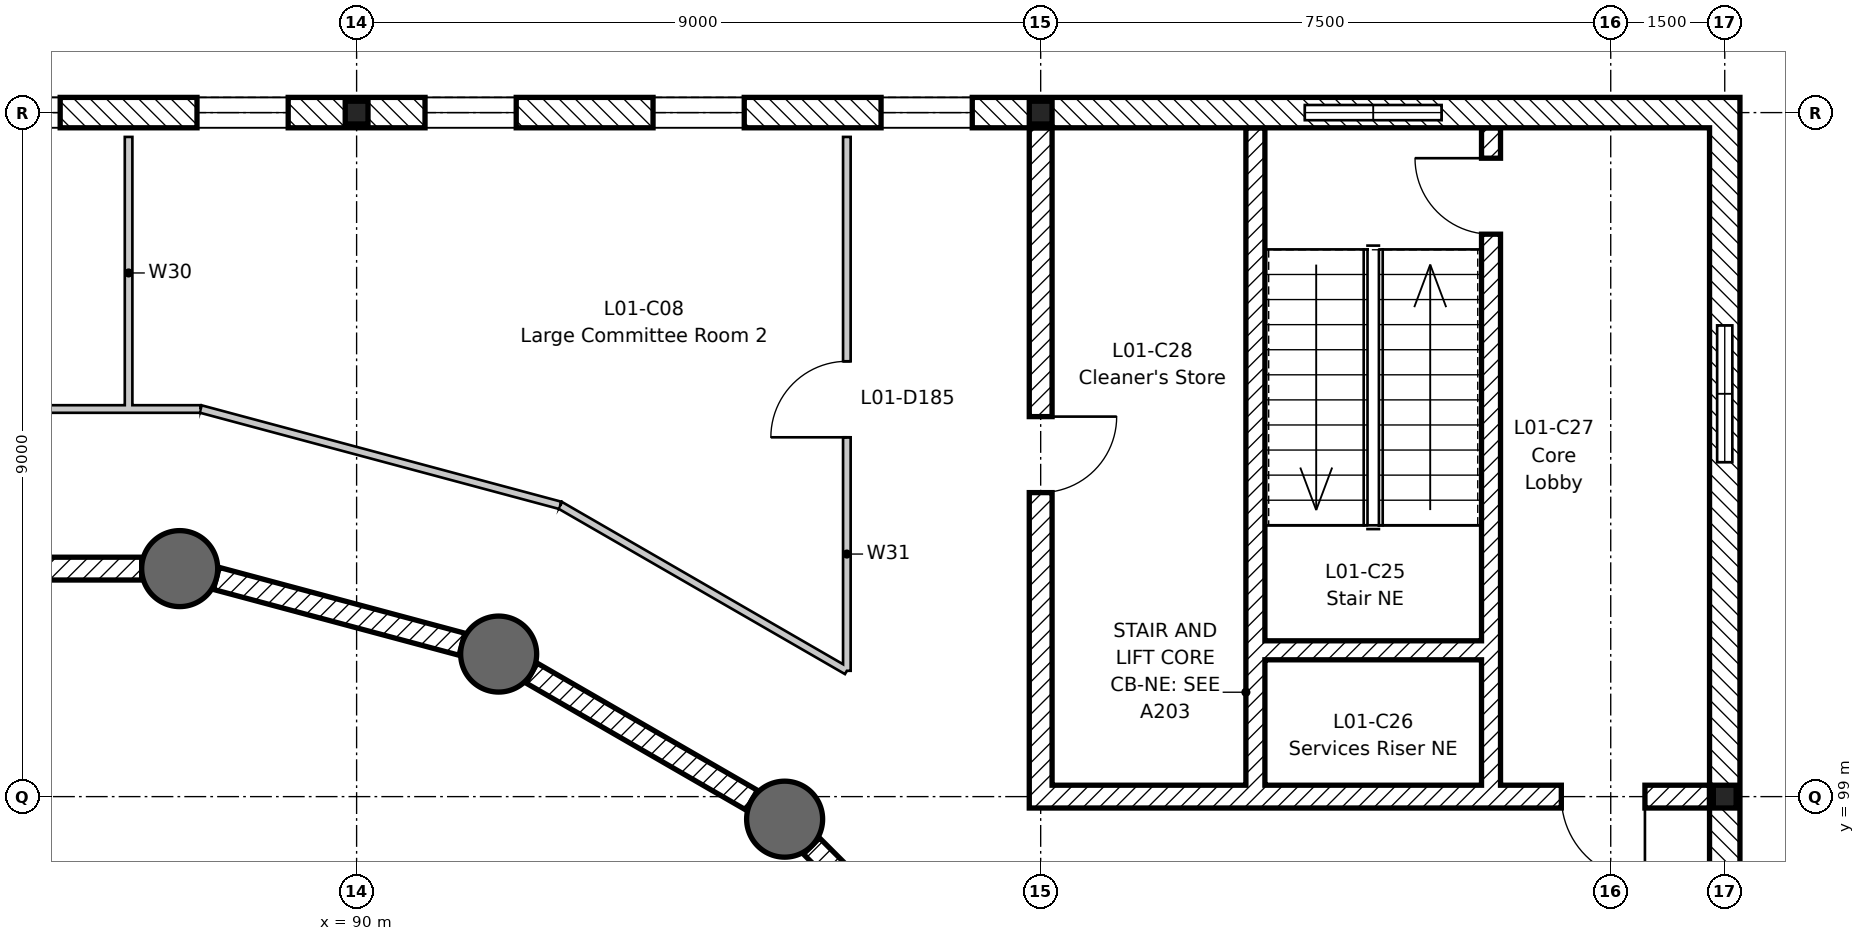
"""IFC4 building model, lengths in metres.
Left out: names, types, materials, properties, quantities, classifications, styles, units other than length and angle.
Written with IfcOpenShell. Run it as: python <this file> out.ifc"""

import sys

from ifc_helpers import new_model, si_unit, direction, frame, frame_2d, origin, origin_2d, place, context, subcontext, project, spatial, rectangle, circle, i_section, extrude, element, fill, save


model = new_model("IFC4")
c1 = context("Model", 3, precision=1e-05, world=origin(), true_north=direction((0.0, 1.0)))
c2 = subcontext(c1, "Body", "Model", "MODEL_VIEW")
j1 = project(units=[si_unit("LENGTHUNIT", "METRE"), si_unit("PLANEANGLEUNIT", "RADIAN")], contexts=[c1])
p1 = place(None, origin())
s1 = spatial("IfcSite", under=j1, at=p1, CompositionType="ELEMENT")
p2 = place(p1, origin())
s2 = spatial("IfcBuilding", under=s1, at=p2, CompositionType="ELEMENT")
p3 = place(p2, frame((0.0, 0.0, 5.4)))
s3 = spatial("IfcBuildingStorey", under=s2, at=p3, CompositionType="ELEMENT", Elevation=5.4)
for number, where, z_axis, x_axis in (
    (1, (95.631, 98.703, -0.2), (0.0, 0.0, 1.0), (1.0, 0.0, 0.0)),
    (2, (91.869, 100.875, -0.2), (0.0, 0.0, 1.0), (1.0, 0.0, 0.0)),
    (3, (87.672, 102.0, -0.2), (0.0, 0.0, 1.0), (1.0, 0.0, 0.0)),
):
    element("IfcColumn", number, at=place(p3, frame(where, z_axis=z_axis, x_axis=x_axis)), inside=s3, PredefinedType="COLUMN", context=c2, shape_type="SweptSolid", body=[
        extrude(circle(Radius=0.5, at=origin_2d()), origin(), (0.0, 0.0, 1.0), 2.7),
    ])
for number, where, z_axis, x_axis in (
    (4, (90.0, 108.0, -0.2), (0.0, 0.0, 1.0), (1.0, 0.0, 0.0)),
    (5, (99.0, 108.0, -0.2), (0.0, 0.0, 1.0), (1.0, 0.0, 0.0)),
    (6, (108.0, 99.0, -0.2), (0.0, 0.0, 1.0), (1.0, 0.0, 0.0)),
):
    element("IfcColumn", number, at=place(p3, frame(where, z_axis=z_axis, x_axis=x_axis)), inside=s3, PredefinedType="COLUMN", context=c2, shape_type="SweptSolid", body=[
        extrude(i_section(OverallWidth=0.3, OverallDepth=0.3, WebThickness=0.011, FlangeThickness=0.019, FilletRadius=0.027, at=origin_2d()), origin(), (0.0, 0.0, 1.0), 4.5),
    ])
p4 = place(p3, frame((98.35, 95.985, 0.0), z_axis=(0.0, 0.0, 1.0), x_axis=(-0.707106781187, 0.707106781187, 0.0)))
e7 = element("IfcWall", 7, at=p4, inside=s3, PredefinedType="PARTITIONING", context=c2, shape_type="SweptSolid", body=[
    extrude(rectangle(XDim=3.344, YDim=0.3, at=frame_2d((1.672, 0.0))), origin(), (0.0, 0.0, 1.0), 2.5),
])
for number, where, z_axis, x_axis in (
    (8, (95.198, 98.953, 0.0), (0.0, 0.0, 1.0), (-0.866, 0.5, 0.0)),
    (9, (91.386, 101.005, 0.0), (0.0, 0.0, 1.0), (-0.966, 0.259, 0.0)),
):
    element("IfcWall", number, at=place(p3, frame(where, z_axis=z_axis, x_axis=x_axis)), inside=s3, PredefinedType="PARTITIONING", context=c2, shape_type="SweptSolid", body=[
        extrude(rectangle(XDim=3.344, YDim=0.3, at=frame_2d((1.672, 0.0))), origin(), (0.0, 0.0, 1.0), 2.5),
    ])
p5 = place(p3, frame((87.172, 102.0, 0.0), z_axis=(0.0, 0.0, 1.0), x_axis=(-1.0, 0.0, 0.0)))
e10 = element("IfcWall", 10, at=p5, inside=s3, PredefinedType="PARTITIONING", context=c2, shape_type="SweptSolid", body=[
    extrude(rectangle(XDim=3.345, YDim=0.3, at=frame_2d((1.672, 0.0))), origin(), (0.0, 0.0, 1.0), 2.5),
])
p6 = place(p3, frame((107.8, 99.0, 0.0), z_axis=(0.0, 0.0, 1.0), x_axis=(-1.0, 0.0, 0.0)))
e11 = element("IfcWall", 11, at=p6, inside=s3, PredefinedType="SHEAR", context=c2, shape_type="SweptSolid", body=[
    extrude(rectangle(XDim=8.95, YDim=0.3, at=frame_2d((4.475, 0.0))), origin(), (0.0, 0.0, 1.0), 4.3),
])
p7 = place(p6, frame((0.85, 0.0, 0.0)))
e12 = element("IfcOpeningElement", 12, at=p7, cuts=e11, PredefinedType="OPENING", context=c2, shape_type="SweptSolid", body=[
    extrude(rectangle(XDim=1.1, YDim=2.1, at=frame_2d((0.55, 1.05))), frame((0.0, 0.16, 0.0), z_axis=(0.0, -1.0, 0.0), x_axis=(1.0, 0.0, 0.0)), (0.0, 0.0, 1.0), 0.32),
])
p8 = place(p3, frame((99.0, 107.8, 0.0), z_axis=(0.0, 0.0, 1.0), x_axis=(0.0, -1.0, 0.0)))
e13 = element("IfcWall", 13, at=p8, inside=s3, PredefinedType="SHEAR", context=c2, shape_type="SweptSolid", body=[
    extrude(rectangle(XDim=8.65, YDim=0.3, at=frame_2d((4.325, 0.0))), origin(), (0.0, 0.0, 1.0), 4.3),
])
p9 = place(p8, frame((3.8, 0.0, 0.0)))
e14 = element("IfcOpeningElement", 14, at=p9, cuts=e13, PredefinedType="OPENING", context=c2, shape_type="SweptSolid", body=[
    extrude(rectangle(XDim=1.0, YDim=2.1, at=frame_2d((0.5, 1.05))), frame((0.0, 0.16, 0.0), z_axis=(0.0, -1.0, 0.0), x_axis=(1.0, 0.0, 0.0)), (0.0, 0.0, 1.0), 0.32),
])
p10 = place(p3, frame((104.925, 107.8, 0.0), z_axis=(0.0, 0.0, 1.0), x_axis=(0.0, -1.0, 0.0)))
e15 = element("IfcWall", 15, at=p10, inside=s3, PredefinedType="SHEAR", context=c2, shape_type="SweptSolid", body=[
    extrude(rectangle(XDim=8.65, YDim=0.25, at=frame_2d((4.325, 0.0))), origin(), (0.0, 0.0, 1.0), 4.3),
])
p11 = place(p10, frame((0.4, 0.0, 0.0)))
e16 = element("IfcOpeningElement", 16, at=p11, cuts=e15, PredefinedType="OPENING", context=c2, shape_type="SweptSolid", body=[
    extrude(rectangle(XDim=1.0, YDim=2.1, at=frame_2d((0.5, 1.05))), frame((0.0, 0.135, 0.0), z_axis=(0.0, -1.0, 0.0), x_axis=(1.0, 0.0, 0.0)), (0.0, 0.0, 1.0), 0.27),
])
p12 = place(p3, frame((101.825, 107.8, 0.0), z_axis=(0.0, 0.0, 1.0), x_axis=(0.0, -1.0, 0.0)))
e17 = element("IfcWall", 17, at=p12, inside=s3, PredefinedType="SHEAR", context=c2, shape_type="SweptSolid", body=[
    extrude(rectangle(XDim=8.65, YDim=0.25, at=frame_2d((4.325, 0.0))), origin(), (0.0, 0.0, 1.0), 4.3),
])
p13 = place(p3, frame((104.8, 100.925, 0.0), z_axis=(0.0, 0.0, 1.0), x_axis=(-1.0, 0.0, 0.0)))
e18 = element("IfcWall", 18, at=p13, inside=s3, PredefinedType="SHEAR", context=c2, shape_type="SweptSolid", body=[
    extrude(rectangle(XDim=2.85, YDim=0.25, at=frame_2d((1.425, 0.0))), origin(), (0.0, 0.0, 1.0), 4.3),
])
p14 = place(p3, frame((72.0, 108.0, 0.0), z_axis=(0.0, 0.0, 1.0), x_axis=(1.0, 0.0, 0.0)))
e19 = element("IfcWall", 19, at=p14, inside=s3, PredefinedType="STANDARD", context=c2, shape_type="SweptSolid", body=[
    extrude(rectangle(XDim=27.0, YDim=0.4, at=frame_2d((13.5, 0.0))), origin(), (0.0, 0.0, 1.0), 3.81),
])
p15 = place(p14, frame((0.9, 0.0, 0.9)))
e20 = element("IfcOpeningElement", 20, at=p15, cuts=e19, PredefinedType="OPENING", context=c2, shape_type="SweptSolid", body=[
    extrude(rectangle(XDim=1.2, YDim=2.4, at=frame_2d((0.6, 1.2))), frame((0.0, 0.21, 0.0), z_axis=(0.0, -1.0, 0.0), x_axis=(1.0, 0.0, 0.0)), (0.0, 0.0, 1.0), 0.42),
])
p16 = place(p14, frame((3.9, 0.0, 0.9)))
e21 = element("IfcOpeningElement", 21, at=p16, cuts=e19, PredefinedType="OPENING", context=c2, shape_type="SweptSolid", body=[
    extrude(rectangle(XDim=1.2, YDim=2.4, at=frame_2d((0.6, 1.2))), frame((0.0, 0.21, 0.0), z_axis=(0.0, -1.0, 0.0), x_axis=(1.0, 0.0, 0.0)), (0.0, 0.0, 1.0), 0.42),
])
p17 = place(p14, frame((6.9, 0.0, 0.9)))
e22 = element("IfcOpeningElement", 22, at=p17, cuts=e19, PredefinedType="OPENING", context=c2, shape_type="SweptSolid", body=[
    extrude(rectangle(XDim=1.2, YDim=2.4, at=frame_2d((0.6, 1.2))), frame((0.0, 0.21, 0.0), z_axis=(0.0, -1.0, 0.0), x_axis=(1.0, 0.0, 0.0)), (0.0, 0.0, 1.0), 0.42),
])
p18 = place(p14, frame((9.9, 0.0, 0.9)))
e23 = element("IfcOpeningElement", 23, at=p18, cuts=e19, PredefinedType="OPENING", context=c2, shape_type="SweptSolid", body=[
    extrude(rectangle(XDim=1.2, YDim=2.4, at=frame_2d((0.6, 1.2))), frame((0.0, 0.21, 0.0), z_axis=(0.0, -1.0, 0.0), x_axis=(1.0, 0.0, 0.0)), (0.0, 0.0, 1.0), 0.42),
])
p19 = place(p14, frame((12.9, 0.0, 0.9)))
e24 = element("IfcOpeningElement", 24, at=p19, cuts=e19, PredefinedType="OPENING", context=c2, shape_type="SweptSolid", body=[
    extrude(rectangle(XDim=1.2, YDim=2.4, at=frame_2d((0.6, 1.2))), frame((0.0, 0.21, 0.0), z_axis=(0.0, -1.0, 0.0), x_axis=(1.0, 0.0, 0.0)), (0.0, 0.0, 1.0), 0.42),
])
p20 = place(p14, frame((15.9, 0.0, 0.9)))
e25 = element("IfcOpeningElement", 25, at=p20, cuts=e19, PredefinedType="OPENING", context=c2, shape_type="SweptSolid", body=[
    extrude(rectangle(XDim=1.2, YDim=2.4, at=frame_2d((0.6, 1.2))), frame((0.0, 0.21, 0.0), z_axis=(0.0, -1.0, 0.0), x_axis=(1.0, 0.0, 0.0)), (0.0, 0.0, 1.0), 0.42),
])
p21 = place(p14, frame((18.9, 0.0, 0.9)))
e26 = element("IfcOpeningElement", 26, at=p21, cuts=e19, PredefinedType="OPENING", context=c2, shape_type="SweptSolid", body=[
    extrude(rectangle(XDim=1.2, YDim=2.4, at=frame_2d((0.6, 1.2))), frame((0.0, 0.21, 0.0), z_axis=(0.0, -1.0, 0.0), x_axis=(1.0, 0.0, 0.0)), (0.0, 0.0, 1.0), 0.42),
])
p22 = place(p14, frame((21.9, 0.0, 0.9)))
e27 = element("IfcOpeningElement", 27, at=p22, cuts=e19, PredefinedType="OPENING", context=c2, shape_type="SweptSolid", body=[
    extrude(rectangle(XDim=1.2, YDim=2.4, at=frame_2d((0.6, 1.2))), frame((0.0, 0.21, 0.0), z_axis=(0.0, -1.0, 0.0), x_axis=(1.0, 0.0, 0.0)), (0.0, 0.0, 1.0), 0.42),
])
p23 = place(p14, frame((24.9, 0.0, 0.9)))
e28 = element("IfcOpeningElement", 28, at=p23, cuts=e19, PredefinedType="OPENING", context=c2, shape_type="SweptSolid", body=[
    extrude(rectangle(XDim=1.2, YDim=2.4, at=frame_2d((0.6, 1.2))), frame((0.0, 0.21, 0.0), z_axis=(0.0, -1.0, 0.0), x_axis=(1.0, 0.0, 0.0)), (0.0, 0.0, 1.0), 0.42),
])
p24 = place(p3, frame((99.0, 108.0, 0.0), z_axis=(0.0, 0.0, 1.0), x_axis=(1.0, 0.0, 0.0)))
e29 = element("IfcWall", 29, at=p24, inside=s3, PredefinedType="STANDARD", context=c2, shape_type="SweptSolid", body=[
    extrude(rectangle(XDim=3.475, YDim=0.4, at=frame_2d((1.738, 0.0))), origin(), (0.0, 0.0, 1.0), 4.3),
])
p25 = place(p3, frame((104.275, 108.0, 0.0), z_axis=(0.0, 0.0, 1.0), x_axis=(1.0, 0.0, 0.0)))
e30 = element("IfcWall", 30, at=p25, inside=s3, PredefinedType="STANDARD", context=c2, shape_type="SweptSolid", body=[
    extrude(rectangle(XDim=3.925, YDim=0.4, at=frame_2d((1.962, 0.0))), origin(), (0.0, 0.0, 1.0), 4.3),
])
p26 = place(p3, frame((102.475, 108.0, 0.0), z_axis=(0.0, 0.0, 1.0), x_axis=(1.0, 0.0, 0.0)))
e31 = element("IfcWall", 31, at=p26, inside=s3, PredefinedType="STANDARD", context=c2, shape_type="SweptSolid", body=[
    extrude(rectangle(XDim=1.8, YDim=0.4, at=frame_2d((0.9, 0.0))), origin(), (0.0, 0.0, 1.0), 0.9),
])
p27 = place(p3, frame((108.0, 72.0, 0.0), z_axis=(0.0, 0.0, 1.0), x_axis=(0.0, 1.0, 0.0)))
e32 = element("IfcWall", 32, at=p27, inside=s3, PredefinedType="STANDARD", context=c2, shape_type="SweptSolid", body=[
    extrude(rectangle(XDim=27.0, YDim=0.4, at=frame_2d((13.5, 0.0))), origin(), (0.0, 0.0, 1.0), 3.81),
])
p28 = place(p27, frame((0.9, 0.0, 0.9)))
e33 = element("IfcOpeningElement", 33, at=p28, cuts=e32, PredefinedType="OPENING", context=c2, shape_type="SweptSolid", body=[
    extrude(rectangle(XDim=1.2, YDim=2.4, at=frame_2d((0.6, 1.2))), frame((0.0, 0.21, 0.0), z_axis=(0.0, -1.0, 0.0), x_axis=(1.0, 0.0, 0.0)), (0.0, 0.0, 1.0), 0.42),
])
p29 = place(p27, frame((3.9, 0.0, 0.9)))
e34 = element("IfcOpeningElement", 34, at=p29, cuts=e32, PredefinedType="OPENING", context=c2, shape_type="SweptSolid", body=[
    extrude(rectangle(XDim=1.2, YDim=2.4, at=frame_2d((0.6, 1.2))), frame((0.0, 0.21, 0.0), z_axis=(0.0, -1.0, 0.0), x_axis=(1.0, 0.0, 0.0)), (0.0, 0.0, 1.0), 0.42),
])
p30 = place(p27, frame((6.9, 0.0, 0.9)))
e35 = element("IfcOpeningElement", 35, at=p30, cuts=e32, PredefinedType="OPENING", context=c2, shape_type="SweptSolid", body=[
    extrude(rectangle(XDim=1.2, YDim=2.4, at=frame_2d((0.6, 1.2))), frame((0.0, 0.21, 0.0), z_axis=(0.0, -1.0, 0.0), x_axis=(1.0, 0.0, 0.0)), (0.0, 0.0, 1.0), 0.42),
])
p31 = place(p27, frame((9.9, 0.0, 0.9)))
e36 = element("IfcOpeningElement", 36, at=p31, cuts=e32, PredefinedType="OPENING", context=c2, shape_type="SweptSolid", body=[
    extrude(rectangle(XDim=1.2, YDim=2.4, at=frame_2d((0.6, 1.2))), frame((0.0, 0.21, 0.0), z_axis=(0.0, -1.0, 0.0), x_axis=(1.0, 0.0, 0.0)), (0.0, 0.0, 1.0), 0.42),
])
p32 = place(p27, frame((12.9, 0.0, 0.9)))
e37 = element("IfcOpeningElement", 37, at=p32, cuts=e32, PredefinedType="OPENING", context=c2, shape_type="SweptSolid", body=[
    extrude(rectangle(XDim=1.2, YDim=2.4, at=frame_2d((0.6, 1.2))), frame((0.0, 0.21, 0.0), z_axis=(0.0, -1.0, 0.0), x_axis=(1.0, 0.0, 0.0)), (0.0, 0.0, 1.0), 0.42),
])
p33 = place(p27, frame((15.9, 0.0, 0.9)))
e38 = element("IfcOpeningElement", 38, at=p33, cuts=e32, PredefinedType="OPENING", context=c2, shape_type="SweptSolid", body=[
    extrude(rectangle(XDim=1.2, YDim=2.4, at=frame_2d((0.6, 1.2))), frame((0.0, 0.21, 0.0), z_axis=(0.0, -1.0, 0.0), x_axis=(1.0, 0.0, 0.0)), (0.0, 0.0, 1.0), 0.42),
])
p34 = place(p27, frame((18.9, 0.0, 0.9)))
e39 = element("IfcOpeningElement", 39, at=p34, cuts=e32, PredefinedType="OPENING", context=c2, shape_type="SweptSolid", body=[
    extrude(rectangle(XDim=1.2, YDim=2.4, at=frame_2d((0.6, 1.2))), frame((0.0, 0.21, 0.0), z_axis=(0.0, -1.0, 0.0), x_axis=(1.0, 0.0, 0.0)), (0.0, 0.0, 1.0), 0.42),
])
p35 = place(p27, frame((21.9, 0.0, 0.9)))
e40 = element("IfcOpeningElement", 40, at=p35, cuts=e32, PredefinedType="OPENING", context=c2, shape_type="SweptSolid", body=[
    extrude(rectangle(XDim=1.2, YDim=2.4, at=frame_2d((0.6, 1.2))), frame((0.0, 0.21, 0.0), z_axis=(0.0, -1.0, 0.0), x_axis=(1.0, 0.0, 0.0)), (0.0, 0.0, 1.0), 0.42),
])
p36 = place(p27, frame((24.9, 0.0, 0.9)))
e41 = element("IfcOpeningElement", 41, at=p36, cuts=e32, PredefinedType="OPENING", context=c2, shape_type="SweptSolid", body=[
    extrude(rectangle(XDim=1.2, YDim=2.4, at=frame_2d((0.6, 1.2))), frame((0.0, 0.21, 0.0), z_axis=(0.0, -1.0, 0.0), x_axis=(1.0, 0.0, 0.0)), (0.0, 0.0, 1.0), 0.42),
])
p37 = place(p3, frame((108.0, 99.0, 0.0), z_axis=(0.0, 0.0, 1.0), x_axis=(0.0, 1.0, 0.0)))
e42 = element("IfcWall", 42, at=p37, inside=s3, PredefinedType="STANDARD", context=c2, shape_type="SweptSolid", body=[
    extrude(rectangle(XDim=4.4, YDim=0.4, at=frame_2d((2.2, 0.0))), origin(), (0.0, 0.0, 1.0), 4.3),
])
p38 = place(p3, frame((108.0, 105.2, 0.0), z_axis=(0.0, 0.0, 1.0), x_axis=(0.0, 1.0, 0.0)))
e43 = element("IfcWall", 43, at=p38, inside=s3, PredefinedType="STANDARD", context=c2, shape_type="SweptSolid", body=[
    extrude(rectangle(XDim=2.6, YDim=0.4, at=frame_2d((1.3, 0.0))), origin(), (0.0, 0.0, 1.0), 4.3),
])
p39 = place(p3, frame((108.0, 103.4, 0.0), z_axis=(0.0, 0.0, 1.0), x_axis=(0.0, 1.0, 0.0)))
e44 = element("IfcWall", 44, at=p39, inside=s3, PredefinedType="STANDARD", context=c2, shape_type="SweptSolid", body=[
    extrude(rectangle(XDim=1.8, YDim=0.4, at=frame_2d((0.9, 0.0))), origin(), (0.0, 0.0, 1.0), 0.9),
])
p40 = place(p3, frame((87.0, 104.1, 0.0), z_axis=(0.0, 0.0, 1.0), x_axis=(0.0, 1.0, 0.0)))
e45 = element("IfcWall", 45, at=p40, inside=s3, PredefinedType="PARTITIONING", context=c2, shape_type="SweptSolid", body=[
    extrude(rectangle(XDim=3.58, YDim=0.1, at=frame_2d((1.79, 0.0))), origin(), (0.0, 0.0, 1.0), 3.81),
])
p41 = place(p3, frame((83.051, 104.1, 0.0), z_axis=(0.0, 0.0, 1.0), x_axis=(1.0, 0.0, 0.0)))
e46 = element("IfcWall", 46, at=p41, inside=s3, PredefinedType="PARTITIONING", context=c2, shape_type="SweptSolid", body=[
    extrude(rectangle(XDim=3.969, YDim=0.1, at=frame_2d((1.984, 0.0))), origin(), (0.0, 0.0, 1.0), 3.81),
])
p42 = place(p3, frame((86.98, 104.1, 0.0), z_axis=(0.0, 0.0, 1.0), x_axis=(1.0, 0.0, 0.0)))
e47 = element("IfcWall", 47, at=p42, inside=s3, PredefinedType="PARTITIONING", context=c2, shape_type="SweptSolid", body=[
    extrude(rectangle(XDim=0.969, YDim=0.1, at=frame_2d((0.484, 0.0))), origin(), (0.0, 0.0, 1.0), 3.81),
])
p43 = place(p3, frame((87.949, 104.1, 0.0), z_axis=(0.0, 0.0, 1.0), x_axis=(0.965923128678, -0.258829112515, 0.0)))
e48 = element("IfcWall", 48, at=p43, inside=s3, PredefinedType="PARTITIONING", context=c2, shape_type="SweptSolid", body=[
    extrude(rectangle(XDim=4.897, YDim=0.1, at=frame_2d((2.449, 0.0))), origin(), (0.0, 0.0, 1.0), 3.81),
])
p44 = place(p3, frame((92.679, 102.833, 0.0), z_axis=(0.0, 0.0, 1.0), x_axis=(0.866029650479, -0.499992644437, 0.0)))
e49 = element("IfcWall", 49, at=p44, inside=s3, PredefinedType="PARTITIONING", context=c2, shape_type="SweptSolid", body=[
    extrude(rectangle(XDim=4.354, YDim=0.1, at=frame_2d((2.177, 0.0))), origin(), (0.0, 0.0, 1.0), 3.81),
])
p45 = place(p3, frame((96.45, 100.656, 0.0), z_axis=(0.0, 0.0, 1.0), x_axis=(0.0, 1.0, 0.0)))
e50 = element("IfcWall", 50, at=p45, inside=s3, PredefinedType="PARTITIONING", context=c2, shape_type="SweptSolid", body=[
    extrude(rectangle(XDim=7.024, YDim=0.1, at=frame_2d((3.512, 0.0))), origin(), (0.0, 0.0, 1.0), 3.81),
])
p46 = place(p45, frame((3.072, 0.0, 0.0)))
e51 = element("IfcOpeningElement", 51, at=p46, cuts=e50, PredefinedType="OPENING", context=c2, shape_type="SweptSolid", body=[
    extrude(rectangle(XDim=1.0, YDim=2.1, at=frame_2d((0.5, 1.05))), frame((0.0, 0.06, 0.0), z_axis=(0.0, -1.0, 0.0), x_axis=(1.0, 0.0, 0.0)), (0.0, 0.0, 1.0), 0.12),
])
p47 = place(p19, origin())
e52 = element("IfcWindow", 52, at=p47, inside=s3, PartitioningType="SINGLE_PANEL", PredefinedType="WINDOW", context=c2, shape_type="SweptSolid", body=[
    extrude(rectangle(XDim=1.2, YDim=2.4, at=frame_2d((0.6, 1.2))), frame((0.0, 0.03, 0.0), z_axis=(0.0, -1.0, 0.0), x_axis=(1.0, 0.0, 0.0)), (0.0, 0.0, 1.0), 0.06),
])
fill(e24, e52)
p48 = place(p20, origin())
e53 = element("IfcWindow", 53, at=p48, inside=s3, PartitioningType="SINGLE_PANEL", PredefinedType="WINDOW", context=c2, shape_type="SweptSolid", body=[
    extrude(rectangle(XDim=1.2, YDim=2.4, at=frame_2d((0.6, 1.2))), frame((0.0, 0.03, 0.0), z_axis=(0.0, -1.0, 0.0), x_axis=(1.0, 0.0, 0.0)), (0.0, 0.0, 1.0), 0.06),
])
fill(e25, e53)
p49 = place(p21, origin())
e54 = element("IfcWindow", 54, at=p49, inside=s3, PartitioningType="SINGLE_PANEL", PredefinedType="WINDOW", context=c2, shape_type="SweptSolid", body=[
    extrude(rectangle(XDim=1.2, YDim=2.4, at=frame_2d((0.6, 1.2))), frame((0.0, 0.03, 0.0), z_axis=(0.0, -1.0, 0.0), x_axis=(1.0, 0.0, 0.0)), (0.0, 0.0, 1.0), 0.06),
])
fill(e26, e54)
p50 = place(p22, origin())
e55 = element("IfcWindow", 55, at=p50, inside=s3, PartitioningType="SINGLE_PANEL", PredefinedType="WINDOW", context=c2, shape_type="SweptSolid", body=[
    extrude(rectangle(XDim=1.2, YDim=2.4, at=frame_2d((0.6, 1.2))), frame((0.0, 0.03, 0.0), z_axis=(0.0, -1.0, 0.0), x_axis=(1.0, 0.0, 0.0)), (0.0, 0.0, 1.0), 0.06),
])
fill(e27, e55)
p51 = place(p23, origin())
e56 = element("IfcWindow", 56, at=p51, inside=s3, PartitioningType="SINGLE_PANEL", PredefinedType="WINDOW", context=c2, shape_type="SweptSolid", body=[
    extrude(rectangle(XDim=1.2, YDim=2.4, at=frame_2d((0.6, 1.2))), frame((0.0, 0.03, 0.0), z_axis=(0.0, -1.0, 0.0), x_axis=(1.0, 0.0, 0.0)), (0.0, 0.0, 1.0), 0.06),
])
fill(e28, e56)
p52 = place(p11, frame((1.0, 0.0, 0.0), z_axis=(0.0, 0.0, 1.0), x_axis=(-1.0, 0.0, 0.0)))
e57 = element("IfcDoor", 57, at=p52, inside=s3, OperationType="SINGLE_SWING_RIGHT", PredefinedType="DOOR", context=c2, shape_type="SweptSolid", body=[
    extrude(rectangle(XDim=1.0, YDim=2.1, at=frame_2d((0.5, 1.05))), frame((0.0, 0.025, 0.0), z_axis=(0.0, -1.0, 0.0), x_axis=(1.0, 0.0, 0.0)), (0.0, 0.0, 1.0), 0.05),
])
fill(e16, e57)
p53 = place(p7, origin())
e58 = element("IfcDoor", 58, at=p53, inside=s3, OperationType="SINGLE_SWING_LEFT", PredefinedType="DOOR", context=c2, shape_type="SweptSolid", body=[
    extrude(rectangle(XDim=1.1, YDim=2.1, at=frame_2d((0.55, 1.05))), frame((0.0, 0.025, 0.0), z_axis=(0.0, -1.0, 0.0), x_axis=(1.0, 0.0, 0.0)), (0.0, 0.0, 1.0), 0.05),
])
fill(e12, e58)
p54 = place(p9, origin())
e59 = element("IfcDoor", 59, at=p54, inside=s3, OperationType="SINGLE_SWING_LEFT", PredefinedType="DOOR", context=c2, shape_type="SweptSolid", body=[
    extrude(rectangle(XDim=1.0, YDim=2.1, at=frame_2d((0.5, 1.05))), frame((0.0, 0.025, 0.0), z_axis=(0.0, -1.0, 0.0), x_axis=(1.0, 0.0, 0.0)), (0.0, 0.0, 1.0), 0.05),
])
fill(e14, e59)
p55 = place(p46, origin())
e60 = element("IfcDoor", 60, at=p55, inside=s3, OperationType="SINGLE_SWING_LEFT", PredefinedType="DOOR", context=c2, shape_type="SweptSolid", body=[
    extrude(rectangle(XDim=1.0, YDim=2.1, at=frame_2d((0.5, 1.05))), frame((0.0, 0.025, 0.0), z_axis=(0.0, -1.0, 0.0), x_axis=(1.0, 0.0, 0.0)), (0.0, 0.0, 1.0), 0.05),
])
fill(e51, e60)
save(model, sys.argv[1])
